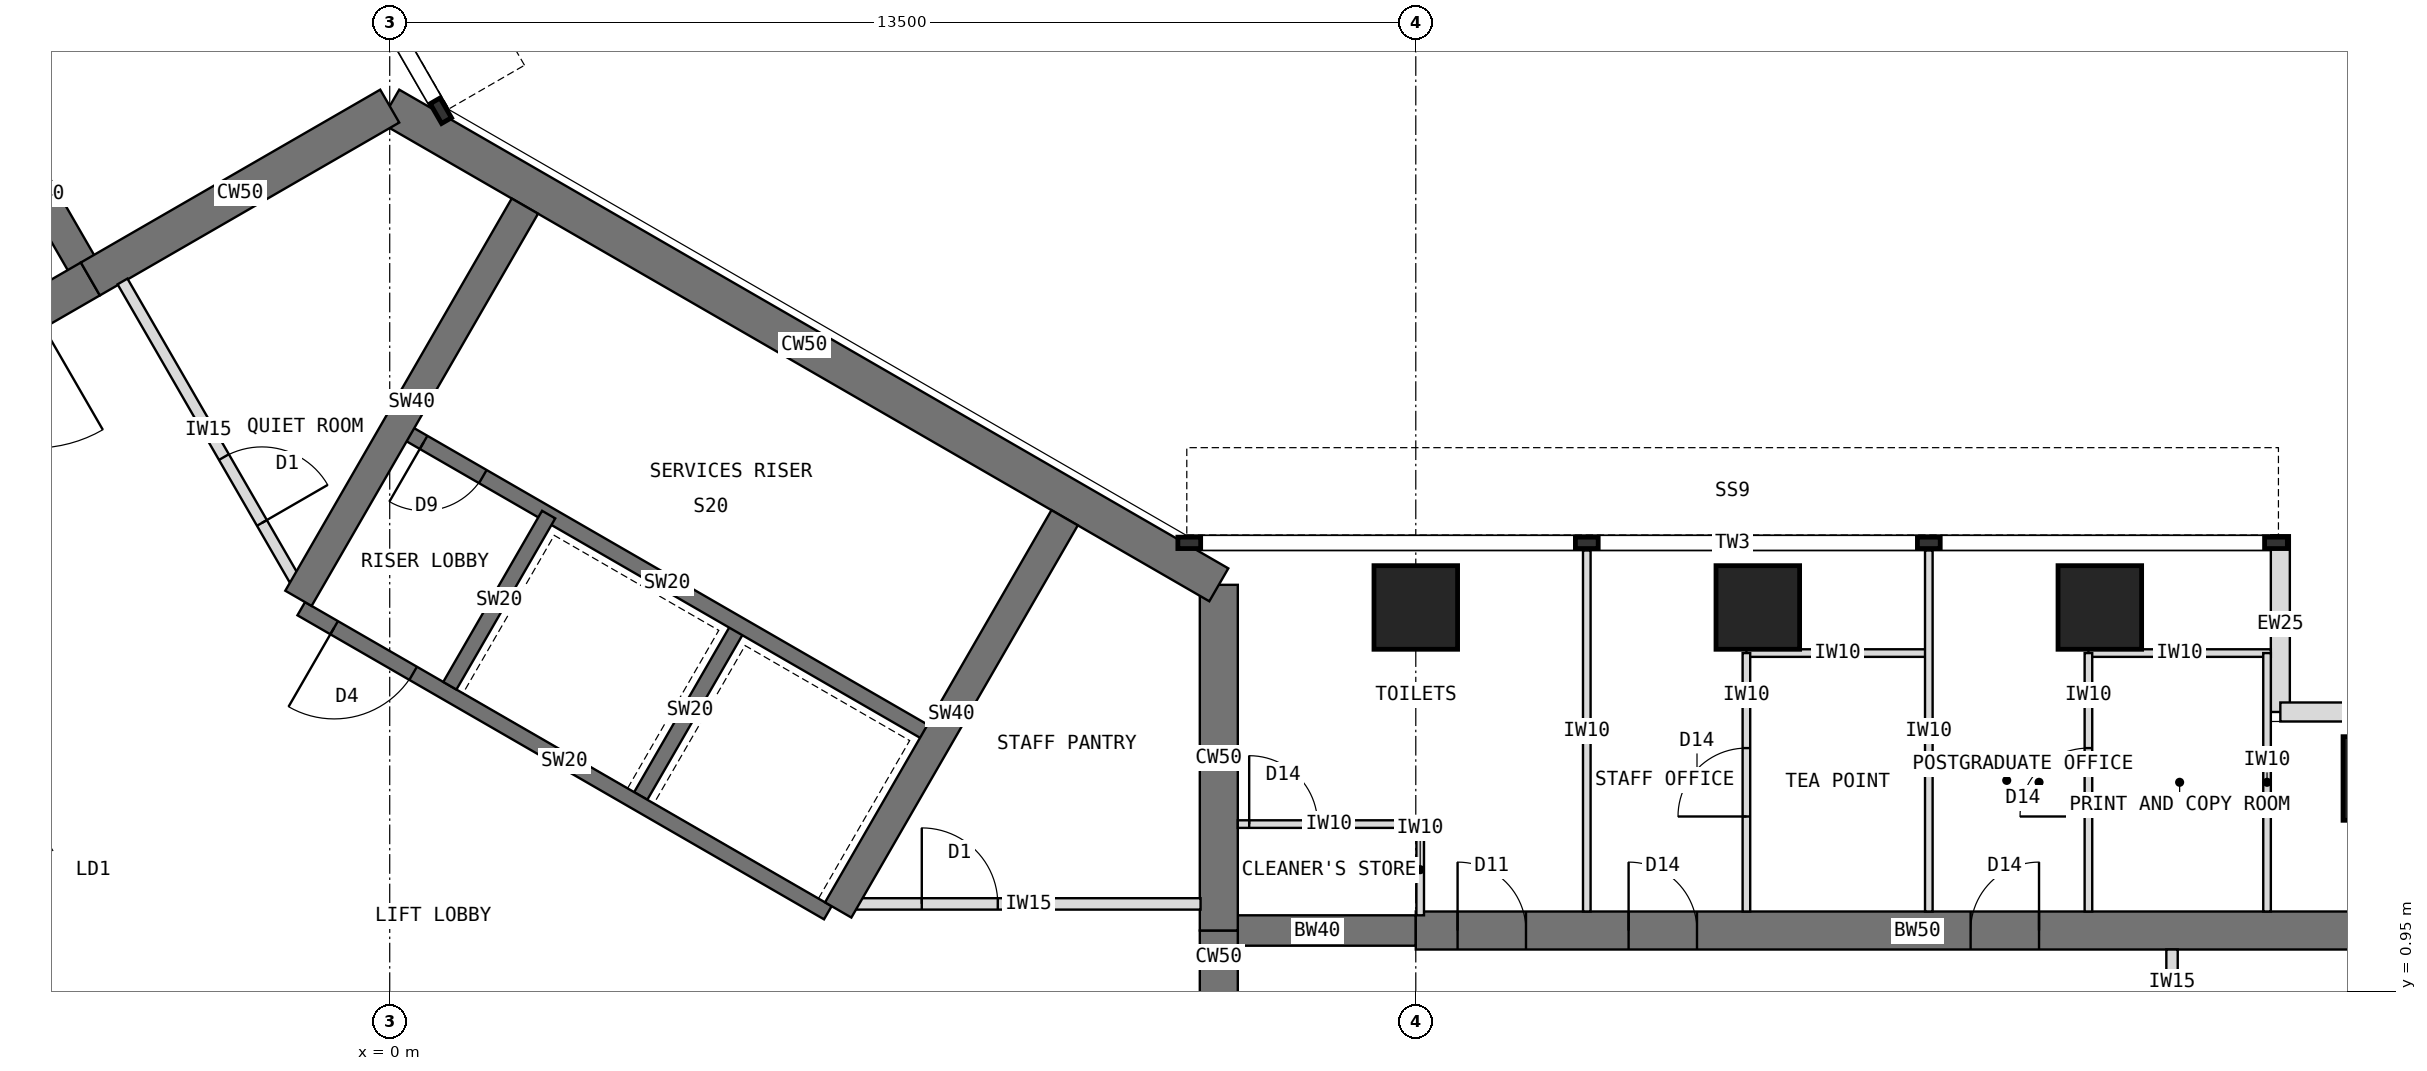
"""IFC4 building model, lengths in metres.
Left out: names, types, materials, properties, quantities, classifications, styles, units other than length and angle.
Written with IfcOpenShell. Run it as: python <this file> out.ifc"""

import sys

from ifc_helpers import new_model, si_unit, direction, frame, frame_2d, origin, origin_2d, place, context, subcontext, project, spatial, rectangle, extrude, element, fill, save


model = new_model("IFC4")
c1 = context("Model", 3, precision=1e-05, world=origin(), true_north=direction((0.0, 1.0)))
c2 = subcontext(c1, "Body", "Model", "MODEL_VIEW")
j1 = project(units=[si_unit("LENGTHUNIT", "METRE"), si_unit("PLANEANGLEUNIT", "RADIAN")], contexts=[c1])
p1 = place(None, origin())
s1 = spatial("IfcSite", under=j1, at=p1, CompositionType="ELEMENT")
p2 = place(p1, origin())
s2 = spatial("IfcBuilding", under=s1, at=p2, CompositionType="ELEMENT")
p3 = place(p2, frame((0.0, 0.0, 230.5)))
s3 = spatial("IfcBuildingStorey", under=s2, at=p3, CompositionType="ELEMENT", Elevation=230.5)
p4 = place(p3, frame((10.908, -1.75, 0.0), z_axis=(0.0, 0.0, 1.0), x_axis=(0.0, 1.0, 0.0)))
e1 = element("IfcWall", 1, at=p4, inside=s3, PredefinedType="SHEAR", context=c2, shape_type="SweptSolid", body=[
    extrude(rectangle(XDim=3.5, YDim=0.5, at=frame_2d((1.75, 0.0))), origin(), (0.0, 0.0, 1.0), 4.0),
])
p5 = place(p4, frame((0.85, 0.0, 0.0)))
e2 = element("IfcOpeningElement", 2, at=p5, cuts=e1, PredefinedType="OPENING", context=c2, shape_type="SweptSolid", body=[
    extrude(rectangle(XDim=1.8, YDim=2.1, at=frame_2d((0.9, 1.05))), frame((0.0, 0.26, 0.0), z_axis=(0.0, -1.0, 0.0), x_axis=(1.0, 0.0, 0.0)), (0.0, 0.0, 1.0), 0.52),
])
p6 = place(p3, frame((10.908, 1.75, 0.0), z_axis=(0.0, 0.0, 1.0), x_axis=(0.0, 1.0, 0.0)))
e3 = element("IfcWall", 3, at=p6, inside=s3, PredefinedType="SHEAR", context=c2, shape_type="SweptSolid", body=[
    extrude(rectangle(XDim=4.548, YDim=0.5, at=frame_2d((2.274, 0.0))), origin(), (0.0, 0.0, 1.0), 4.0),
])
p7 = place(p3, frame((10.908, 6.298, 0.0), z_axis=(0.0, 0.0, 1.0), x_axis=(-0.866021940709, 0.500005998175, 0.0)))
e4 = element("IfcWall", 4, at=p7, inside=s3, PredefinedType="SHEAR", context=c2, shape_type="SweptSolid", body=[
    extrude(rectangle(XDim=12.596, YDim=0.5, at=frame_2d((6.298, 0.0))), origin(), (0.0, 0.0, 1.0), 4.0),
])
p8 = place(p3, frame((0.0, 12.596, 0.0), z_axis=(0.0, 0.0, 1.0), x_axis=(-0.866011268655, -0.500024481964, 0.0)))
e5 = element("IfcWall", 5, at=p8, inside=s3, PredefinedType="SHEAR", context=c2, shape_type="SweptSolid", body=[
    extrude(rectangle(XDim=4.548, YDim=0.5, at=frame_2d((2.274, 0.0))), origin(), (0.0, 0.0, 1.0), 4.0),
])
p9 = place(p3, frame((-3.939, 10.322, 0.0), z_axis=(0.0, 0.0, 1.0), x_axis=(-0.866019471182, -0.500010275428, 0.0)))
e6 = element("IfcWall", 6, at=p9, inside=s3, PredefinedType="SHEAR", context=c2, shape_type="SweptSolid", body=[
    extrude(rectangle(XDim=3.5, YDim=0.5, at=frame_2d((1.75, 0.0))), origin(), (0.0, 0.0, 1.0), 4.0),
])
p10 = place(p9, frame((0.85, 0.0, 0.0)))
e7 = element("IfcOpeningElement", 7, at=p10, cuts=e6, PredefinedType="OPENING", context=c2, shape_type="SweptSolid", body=[
    extrude(rectangle(XDim=1.8, YDim=2.1, at=frame_2d((0.9, 1.05))), frame((0.0, 0.26, 0.0), z_axis=(0.0, -1.0, 0.0), x_axis=(1.0, 0.0, 0.0)), (0.0, 0.0, 1.0), 0.52),
])
p11 = place(p3, frame((10.908, 1.75, 0.0), z_axis=(0.0, 0.0, 1.0), x_axis=(1.0, 0.0, 0.0)))
e8 = element("IfcWall", 8, at=p11, inside=s3, PredefinedType="SHEAR", context=c2, shape_type="SweptSolid", body=[
    extrude(rectangle(XDim=2.592, YDim=0.4, at=frame_2d((1.296, 0.0))), origin(), (0.0, 0.0, 1.0), 4.0),
])
p12 = place(p3, frame((13.5, 1.75, 0.0), z_axis=(0.0, 0.0, 1.0), x_axis=(1.0, 0.0, 0.0)))
e9 = element("IfcWall", 9, at=p12, inside=s3, PredefinedType="SHEAR", context=c2, shape_type="SweptSolid", body=[
    extrude(rectangle(XDim=13.2, YDim=0.5, at=frame_2d((6.6, 0.0))), origin(), (0.0, 0.0, 1.0), 4.0),
])
p13 = place(p12, frame((0.55, 0.0, 0.0)))
e10 = element("IfcOpeningElement", 10, at=p13, cuts=e9, PredefinedType="OPENING", context=c2, shape_type="SweptSolid", body=[
    extrude(rectangle(XDim=0.9, YDim=2.1, at=frame_2d((0.45, 1.05))), frame((0.0, 0.26, 0.0), z_axis=(0.0, -1.0, 0.0), x_axis=(1.0, 0.0, 0.0)), (0.0, 0.0, 1.0), 0.52),
])
p14 = place(p12, frame((2.8, 0.0, 0.0)))
e11 = element("IfcOpeningElement", 11, at=p14, cuts=e9, PredefinedType="OPENING", context=c2, shape_type="SweptSolid", body=[
    extrude(rectangle(XDim=0.9, YDim=2.1, at=frame_2d((0.45, 1.05))), frame((0.0, 0.26, 0.0), z_axis=(0.0, -1.0, 0.0), x_axis=(1.0, 0.0, 0.0)), (0.0, 0.0, 1.0), 0.52),
])
p15 = place(p12, frame((7.3, 0.0, 0.0)))
e12 = element("IfcOpeningElement", 12, at=p15, cuts=e9, PredefinedType="OPENING", context=c2, shape_type="SweptSolid", body=[
    extrude(rectangle(XDim=0.9, YDim=2.1, at=frame_2d((0.45, 1.05))), frame((0.0, 0.26, 0.0), z_axis=(0.0, -1.0, 0.0), x_axis=(1.0, 0.0, 0.0)), (0.0, 0.0, 1.0), 0.52),
])
p16 = place(p3, frame((-3.939, 10.322, 0.0), z_axis=(0.0, 0.0, 1.0), x_axis=(-0.499918158782, 0.866072649678, 0.0)))
e13 = element("IfcWall", 13, at=p16, inside=s3, PredefinedType="SHEAR", context=c2, shape_type="SweptSolid", body=[
    extrude(rectangle(XDim=2.592, YDim=0.4, at=frame_2d((1.296, 0.0))), origin(), (0.0, 0.0, 1.0), 4.0),
])
for number, where, z_axis, x_axis in (
    (14, (13.5, 6.0, 0.0), (0.0, 0.0, 1.0), (1.0, 0.0, 0.0)),
    (15, (18.0, 6.0, 0.0), (0.0, 0.0, 1.0), (1.0, 0.0, 0.0)),
    (16, (22.5, 6.0, 0.0), (0.0, 0.0, 1.0), (1.0, 0.0, 0.0)),
    (17, (26.25, 3.75, 0.0), (0.0, 0.0, 1.0), (1.0, 0.0, 0.0)),
):
    element("IfcColumn", number, at=place(p3, frame(where, z_axis=z_axis, x_axis=x_axis)), inside=s3, PredefinedType="COLUMN", context=c2, shape_type="SweptSolid", body=[
        extrude(rectangle(XDim=1.1, YDim=1.1, at=origin_2d()), origin(), (0.0, 0.0, 1.0), 4.0),
    ])
for number, where, z_axis, x_axis in (
    (18, (24.875, 6.95, 0.0), (0.0, 0.0, 1.0), (0.0, -1.0, 0.0)),
    (19, (24.875, 4.625, 0.0), (0.0, 0.0, 1.0), (1.0, 0.0, 0.0)),
):
    element("IfcWall", number, at=place(p3, frame(where, z_axis=z_axis, x_axis=x_axis)), inside=s3, PredefinedType="STANDARD", context=c2, shape_type="SweptSolid", body=[
        extrude(rectangle(XDim=2.325, YDim=0.25, at=frame_2d((1.163, 0.0))), origin(), (0.0, 0.0, 1.0), 3.8),
    ])
p17 = place(p3, frame((5.764, 1.984, 0.0), z_axis=(0.0, 0.0, 1.0), x_axis=(-0.866026010844, 0.49999894854, 0.0)))
e20 = element("IfcWall", 20, at=p17, inside=s3, PredefinedType="SHEAR", context=c2, shape_type="SweptSolid", body=[
    extrude(rectangle(XDim=8.0, YDim=0.2, at=frame_2d((4.0, 0.0))), origin(), (0.0, 0.0, 1.0), 4.0),
])
p18 = place(p17, frame((6.3, 0.0, 0.0)))
e21 = element("IfcOpeningElement", 21, at=p18, cuts=e20, PredefinedType="OPENING", context=c2, shape_type="SweptSolid", body=[
    extrude(rectangle(XDim=1.2, YDim=2.1, at=frame_2d((0.6, 1.05))), frame((0.0, 0.11, 0.0), z_axis=(0.0, -1.0, 0.0), x_axis=(1.0, 0.0, 0.0)), (0.0, 0.0, 1.0), 0.22),
])
for number, where, z_axis, x_axis in (
    (22, (3.303, 3.52, 0.0), (0.0, 0.0, 1.0), (0.5, 0.866, 0.0)),
    (23, (0.791, 4.97, 0.0), (0.0, 0.0, 1.0), (0.5, 0.866, 0.0)),
):
    element("IfcWall", number, at=place(p3, frame(where, z_axis=z_axis, x_axis=x_axis)), inside=s3, PredefinedType="SHEAR", context=c2, shape_type="SweptSolid", body=[
        extrude(rectangle(XDim=2.6, YDim=0.2, at=frame_2d((1.3, 0.0))), origin(), (0.0, 0.0, 1.0), 4.0),
    ])
p19 = place(p3, frame((7.114, 4.322, 0.0), z_axis=(0.0, 0.0, 1.0), x_axis=(-0.866026010844, 0.49999894854, 0.0)))
e24 = element("IfcWall", 24, at=p19, inside=s3, PredefinedType="SHEAR", context=c2, shape_type="SweptSolid", body=[
    extrude(rectangle(XDim=8.0, YDim=0.2, at=frame_2d((4.0, 0.0))), origin(), (0.0, 0.0, 1.0), 4.0),
])
p20 = place(p19, frame((6.8, 0.0, 0.0)))
e25 = element("IfcOpeningElement", 25, at=p20, cuts=e24, PredefinedType="OPENING", context=c2, shape_type="SweptSolid", body=[
    extrude(rectangle(XDim=0.9, YDim=2.1, at=frame_2d((0.45, 1.05))), frame((0.0, 0.11, 0.0), z_axis=(0.0, -1.0, 0.0), x_axis=(1.0, 0.0, 0.0)), (0.0, 0.0, 1.0), 0.22),
])
p21 = place(p3, frame((-1.201, 6.12, 0.0), z_axis=(0.0, 0.0, 1.0), x_axis=(0.500021575205, 0.866012946976, 0.0)))
e26 = element("IfcWall", 26, at=p21, inside=s3, PredefinedType="SHEAR", context=c2, shape_type="SweptSolid", body=[
    extrude(rectangle(XDim=5.958, YDim=0.4, at=frame_2d((2.979, 0.0))), origin(), (0.0, 0.0, 1.0), 4.0),
])
p22 = place(p3, frame((5.901, 2.02, 0.0), z_axis=(0.0, 0.0, 1.0), x_axis=(0.500003832394, 0.86602319114, 0.0)))
e27 = element("IfcWall", 27, at=p22, inside=s3, PredefinedType="SHEAR", context=c2, shape_type="SweptSolid", body=[
    extrude(rectangle(XDim=5.958, YDim=0.4, at=frame_2d((2.979, 0.0))), origin(), (0.0, 0.0, 1.0), 4.0),
])
for number, where, z_axis, x_axis in (
    (28, (15.75, 2.0, 0.0), (0.0, 0.0, 1.0), (0.0, 1.0, 0.0)),
    (29, (20.25, 2.0, 0.0), (0.0, 0.0, 1.0), (0.0, 1.0, 0.0)),
):
    element("IfcWall", number, at=place(p3, frame(where, z_axis=z_axis, x_axis=x_axis)), inside=s3, PredefinedType="PARTITIONING", context=c2, shape_type="SweptSolid", body=[
        extrude(rectangle(XDim=4.75, YDim=0.1, at=frame_2d((2.375, 0.0))), origin(), (0.0, 0.0, 1.0), 3.8),
    ])
p23 = place(p3, frame((17.85, 5.4, 0.0), z_axis=(0.0, 0.0, 1.0), x_axis=(1.0, 0.0, 0.0)))
e30 = element("IfcWall", 30, at=p23, inside=s3, PredefinedType="PARTITIONING", context=c2, shape_type="SweptSolid", body=[
    extrude(rectangle(XDim=2.4, YDim=0.1, at=frame_2d((1.2, 0.0))), origin(), (0.0, 0.0, 1.0), 3.8),
])
p24 = place(p3, frame((17.85, 2.0, 0.0), z_axis=(0.0, 0.0, 1.0), x_axis=(0.0, 1.0, 0.0)))
e31 = element("IfcWall", 31, at=p24, inside=s3, PredefinedType="PARTITIONING", context=c2, shape_type="SweptSolid", body=[
    extrude(rectangle(XDim=3.4, YDim=0.1, at=frame_2d((1.7, 0.0))), origin(), (0.0, 0.0, 1.0), 3.8),
])
p25 = place(p24, frame((1.25, 0.0, 0.0)))
e32 = element("IfcOpeningElement", 32, at=p25, cuts=e31, PredefinedType="OPENING", context=c2, shape_type="SweptSolid", body=[
    extrude(rectangle(XDim=0.9, YDim=2.1, at=frame_2d((0.45, 1.05))), frame((0.0, 0.06, 0.0), z_axis=(0.0, -1.0, 0.0), x_axis=(1.0, 0.0, 0.0)), (0.0, 0.0, 1.0), 0.12),
])
p26 = place(p3, frame((22.35, 5.4, 0.0), z_axis=(0.0, 0.0, 1.0), x_axis=(1.0, 0.0, 0.0)))
e33 = element("IfcWall", 33, at=p26, inside=s3, PredefinedType="PARTITIONING", context=c2, shape_type="SweptSolid", body=[
    extrude(rectangle(XDim=2.4, YDim=0.1, at=frame_2d((1.2, 0.0))), origin(), (0.0, 0.0, 1.0), 3.8),
])
p27 = place(p3, frame((22.35, 2.0, 0.0), z_axis=(0.0, 0.0, 1.0), x_axis=(0.0, 1.0, 0.0)))
e34 = element("IfcWall", 34, at=p27, inside=s3, PredefinedType="PARTITIONING", context=c2, shape_type="SweptSolid", body=[
    extrude(rectangle(XDim=3.4, YDim=0.1, at=frame_2d((1.7, 0.0))), origin(), (0.0, 0.0, 1.0), 3.8),
])
p28 = place(p27, frame((1.25, 0.0, 0.0)))
e35 = element("IfcOpeningElement", 35, at=p28, cuts=e34, PredefinedType="OPENING", context=c2, shape_type="SweptSolid", body=[
    extrude(rectangle(XDim=0.9, YDim=2.1, at=frame_2d((0.45, 1.05))), frame((0.0, 0.06, 0.0), z_axis=(0.0, -1.0, 0.0), x_axis=(1.0, 0.0, 0.0)), (0.0, 0.0, 1.0), 0.12),
])
p29 = place(p3, frame((24.7, 2.0, 0.0), z_axis=(0.0, 0.0, 1.0), x_axis=(0.0, 1.0, 0.0)))
e36 = element("IfcWall", 36, at=p29, inside=s3, PredefinedType="PARTITIONING", context=c2, shape_type="SweptSolid", body=[
    extrude(rectangle(XDim=3.4, YDim=0.1, at=frame_2d((1.7, 0.0))), origin(), (0.0, 0.0, 1.0), 3.8),
])
p30 = place(p3, frame((11.158, 3.15, 0.0), z_axis=(0.0, 0.0, 1.0), x_axis=(1.0, 0.0, 0.0)))
e37 = element("IfcWall", 37, at=p30, inside=s3, PredefinedType="PARTITIONING", context=c2, shape_type="SweptSolid", body=[
    extrude(rectangle(XDim=2.4, YDim=0.1, at=frame_2d((1.2, 0.0))), origin(), (0.0, 0.0, 1.0), 3.8),
])
p31 = place(p30, frame((0.15, 0.0, 0.0)))
e38 = element("IfcOpeningElement", 38, at=p31, cuts=e37, PredefinedType="OPENING", context=c2, shape_type="SweptSolid", body=[
    extrude(rectangle(XDim=0.9, YDim=2.1, at=frame_2d((0.45, 1.05))), frame((0.0, 0.06, 0.0), z_axis=(0.0, -1.0, 0.0), x_axis=(1.0, 0.0, 0.0)), (0.0, 0.0, 1.0), 0.12),
])
p32 = place(p3, frame((13.558, 1.95, 0.0), z_axis=(0.0, 0.0, 1.0), x_axis=(0.0, 1.0, 0.0)))
e39 = element("IfcWall", 39, at=p32, inside=s3, PredefinedType="PARTITIONING", context=c2, shape_type="SweptSolid", body=[
    extrude(rectangle(XDim=1.2, YDim=0.1, at=frame_2d((0.6, 0.0))), origin(), (0.0, 0.0, 1.0), 3.267),
])
p33 = place(p3, frame((-3.515, 10.289, 0.0), z_axis=(0.0, 0.0, 1.0), x_axis=(0.499968392031, -0.866043651885, 0.0)))
e40 = element("IfcWall", 40, at=p33, inside=s3, PredefinedType="PARTITIONING", context=c2, shape_type="SweptSolid", body=[
    extrude(rectangle(XDim=4.526, YDim=0.15, at=frame_2d((2.263, 0.0))), origin(), (0.0, 0.0, 1.0), 3.8),
])
p34 = place(p33, frame((2.668, 0.0, 0.0)))
e41 = element("IfcOpeningElement", 41, at=p34, cuts=e40, PredefinedType="OPENING", context=c2, shape_type="SweptSolid", body=[
    extrude(rectangle(XDim=1.0, YDim=2.1, at=frame_2d((0.5, 1.05))), frame((0.0, 0.085, 0.0), z_axis=(0.0, -1.0, 0.0), x_axis=(1.0, 0.0, 0.0)), (0.0, 0.0, 1.0), 0.17),
])
p35 = place(p3, frame((6.143, 2.1, 0.0), z_axis=(0.0, 0.0, 1.0), x_axis=(1.0, 0.0, 0.0)))
e42 = element("IfcWall", 42, at=p35, inside=s3, PredefinedType="PARTITIONING", context=c2, shape_type="SweptSolid", body=[
    extrude(rectangle(XDim=4.526, YDim=0.15, at=frame_2d((2.263, 0.0))), origin(), (0.0, 0.0, 1.0), 3.8),
])
p36 = place(p35, frame((0.858, 0.0, 0.0)))
e43 = element("IfcOpeningElement", 43, at=p36, cuts=e42, PredefinedType="OPENING", context=c2, shape_type="SweptSolid", body=[
    extrude(rectangle(XDim=1.0, YDim=2.1, at=frame_2d((0.5, 1.05))), frame((0.0, 0.085, 0.0), z_axis=(0.0, -1.0, 0.0), x_axis=(1.0, 0.0, 0.0)), (0.0, 0.0, 1.0), 0.17),
])
p37 = place(p3, frame((23.45, -1.5, 0.0), z_axis=(0.0, 0.0, 1.0), x_axis=(0.0, 1.0, 0.0)))
e44 = element("IfcWall", 44, at=p37, inside=s3, PredefinedType="PARTITIONING", context=c2, shape_type="SweptSolid", body=[
    extrude(rectangle(XDim=3.0, YDim=0.15, at=frame_2d((1.5, 0.0))), origin(), (0.0, 0.0, 1.0), 3.8),
])
p38 = place(p37, frame((1.0, 0.0, 0.0)))
e45 = element("IfcOpeningElement", 45, at=p38, cuts=e44, PredefinedType="OPENING", context=c2, shape_type="SweptSolid", body=[
    extrude(rectangle(XDim=1.0, YDim=2.1, at=frame_2d((0.5, 1.05))), frame((0.0, 0.085, 0.0), z_axis=(0.0, -1.0, 0.0), x_axis=(1.0, 0.0, 0.0)), (0.0, 0.0, 1.0), 0.17),
])
p39 = place(p18, origin())
e46 = element("IfcDoor", 46, at=p39, inside=s3, OperationType="SINGLE_SWING_RIGHT", PredefinedType="DOOR", context=c2, shape_type="SweptSolid", body=[
    extrude(rectangle(XDim=1.2, YDim=2.1, at=frame_2d((0.6, 1.05))), frame((0.0, 0.025, 0.0), z_axis=(0.0, -1.0, 0.0), x_axis=(1.0, 0.0, 0.0)), (0.0, 0.0, 1.0), 0.05),
])
fill(e21, e46)
p40 = place(p20, origin())
e47 = element("IfcDoor", 47, at=p40, inside=s3, OperationType="SINGLE_SWING_RIGHT", PredefinedType="DOOR", context=c2, shape_type="SweptSolid", body=[
    extrude(rectangle(XDim=0.9, YDim=2.1, at=frame_2d((0.45, 1.05))), frame((0.0, 0.025, 0.0), z_axis=(0.0, -1.0, 0.0), x_axis=(1.0, 0.0, 0.0)), (0.0, 0.0, 1.0), 0.05),
])
fill(e25, e47)
p41 = place(p25, origin())
e48 = element("IfcDoor", 48, at=p41, inside=s3, OperationType="SINGLE_SWING_LEFT", PredefinedType="DOOR", context=c2, shape_type="SweptSolid", body=[
    extrude(rectangle(XDim=0.9, YDim=2.1, at=frame_2d((0.45, 1.05))), frame((0.0, 0.025, 0.0), z_axis=(0.0, -1.0, 0.0), x_axis=(1.0, 0.0, 0.0)), (0.0, 0.0, 1.0), 0.05),
])
fill(e32, e48)
p42 = place(p28, origin())
e49 = element("IfcDoor", 49, at=p42, inside=s3, OperationType="SINGLE_SWING_LEFT", PredefinedType="DOOR", context=c2, shape_type="SweptSolid", body=[
    extrude(rectangle(XDim=0.9, YDim=2.1, at=frame_2d((0.45, 1.05))), frame((0.0, 0.025, 0.0), z_axis=(0.0, -1.0, 0.0), x_axis=(1.0, 0.0, 0.0)), (0.0, 0.0, 1.0), 0.05),
])
fill(e35, e49)
p43 = place(p31, origin())
e50 = element("IfcDoor", 50, at=p43, inside=s3, OperationType="SINGLE_SWING_LEFT", PredefinedType="DOOR", context=c2, shape_type="SweptSolid", body=[
    extrude(rectangle(XDim=0.9, YDim=2.1, at=frame_2d((0.45, 1.05))), frame((0.0, 0.025, 0.0), z_axis=(0.0, -1.0, 0.0), x_axis=(1.0, 0.0, 0.0)), (0.0, 0.0, 1.0), 0.05),
])
fill(e38, e50)
p44 = place(p36, origin())
e51 = element("IfcDoor", 51, at=p44, inside=s3, OperationType="SINGLE_SWING_LEFT", PredefinedType="DOOR", context=c2, shape_type="SweptSolid", body=[
    extrude(rectangle(XDim=1.0, YDim=2.1, at=frame_2d((0.5, 1.05))), frame((0.0, 0.025, 0.0), z_axis=(0.0, -1.0, 0.0), x_axis=(1.0, 0.0, 0.0)), (0.0, 0.0, 1.0), 0.05),
])
fill(e43, e51)
p45 = place(p34, origin())
e52 = element("IfcDoor", 52, at=p45, inside=s3, OperationType="SINGLE_SWING_RIGHT", PredefinedType="DOOR", context=c2, shape_type="SweptSolid", body=[
    extrude(rectangle(XDim=1.0, YDim=2.1, at=frame_2d((0.5, 1.05))), frame((0.0, 0.025, 0.0), z_axis=(0.0, -1.0, 0.0), x_axis=(1.0, 0.0, 0.0)), (0.0, 0.0, 1.0), 0.05),
])
fill(e41, e52)
p46 = place(p13, origin())
e53 = element("IfcDoor", 53, at=p46, inside=s3, OperationType="SINGLE_SWING_LEFT", PredefinedType="DOOR", context=c2, shape_type="SweptSolid", body=[
    extrude(rectangle(XDim=0.9, YDim=2.1, at=frame_2d((0.45, 1.05))), frame((0.0, 0.025, 0.0), z_axis=(0.0, -1.0, 0.0), x_axis=(1.0, 0.0, 0.0)), (0.0, 0.0, 1.0), 0.05),
])
fill(e10, e53)
p47 = place(p14, origin())
e54 = element("IfcDoor", 54, at=p47, inside=s3, OperationType="SINGLE_SWING_LEFT", PredefinedType="DOOR", context=c2, shape_type="SweptSolid", body=[
    extrude(rectangle(XDim=0.9, YDim=2.1, at=frame_2d((0.45, 1.05))), frame((0.0, 0.025, 0.0), z_axis=(0.0, -1.0, 0.0), x_axis=(1.0, 0.0, 0.0)), (0.0, 0.0, 1.0), 0.05),
])
fill(e11, e54)
p48 = place(p15, origin())
e55 = element("IfcDoor", 55, at=p48, inside=s3, OperationType="SINGLE_SWING_RIGHT", PredefinedType="DOOR", context=c2, shape_type="SweptSolid", body=[
    extrude(rectangle(XDim=0.9, YDim=2.1, at=frame_2d((0.45, 1.05))), frame((0.0, 0.025, 0.0), z_axis=(0.0, -1.0, 0.0), x_axis=(1.0, 0.0, 0.0)), (0.0, 0.0, 1.0), 0.05),
])
fill(e12, e55)
save(model, sys.argv[1])
